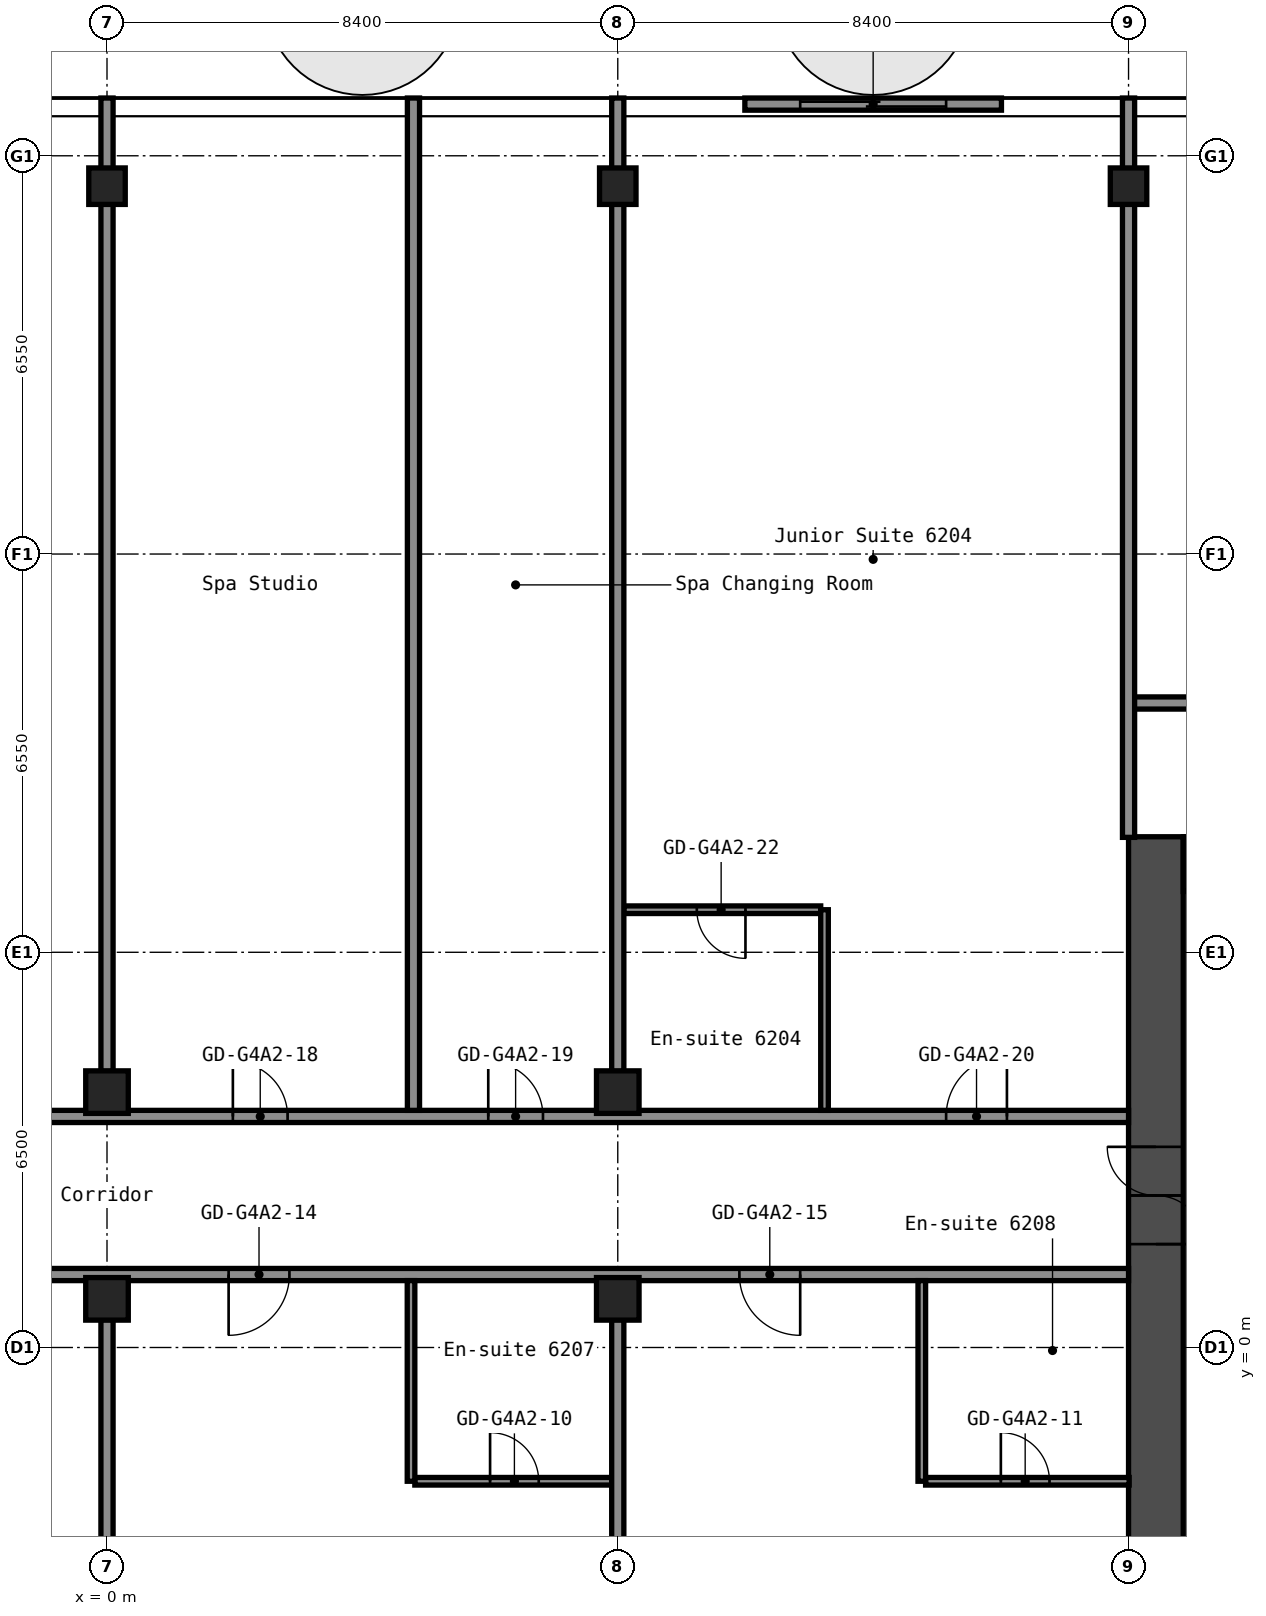
"""IFC4 building model, lengths in metres.
Left out: names, types, materials, properties, quantities, classifications, styles, units other than length and angle.
Written with IfcOpenShell. Run it as: python <this file> out.ifc"""

import sys

from ifc_helpers import new_model, si_unit, direction, frame, frame_2d, origin, origin_2d, place, context, subcontext, project, spatial, rectangle, hollow_rectangle, extrude, element, fill, save


model = new_model("IFC4")
c1 = context("Model", 3, precision=1e-05, world=origin(), true_north=direction((0.0, 1.0)))
c2 = subcontext(c1, "Body", "Model", "MODEL_VIEW")
j1 = project(units=[si_unit("LENGTHUNIT", "METRE"), si_unit("PLANEANGLEUNIT", "RADIAN")], contexts=[c1])
p1 = place(None, origin())
s1 = spatial("IfcSite", under=j1, at=p1, CompositionType="ELEMENT")
p2 = place(p1, origin())
s2 = spatial("IfcBuilding", under=s1, at=p2, CompositionType="ELEMENT")
p3 = place(p2, frame((0.0, 0.0, 218.6)))
s3 = spatial("IfcBuildingStorey", under=s2, at=p3, CompositionType="ELEMENT", Elevation=218.6)
for number, where, z_axis, x_axis in (
    (1, (0.0, 0.8, 0.0), (0.0, 0.0, 1.0), (1.0, 0.0, 0.0)),
    (2, (0.0, 4.2, 0.0), (0.0, 0.0, 1.0), (1.0, 0.0, 0.0)),
):
    element("IfcColumn", number, at=place(p3, frame(where, z_axis=z_axis, x_axis=x_axis)), inside=s3, PredefinedType="COLUMN", context=c2, shape_type="SweptSolid", body=[
        extrude(hollow_rectangle(XDim=0.7, YDim=0.7, WallThickness=0.028, at=origin_2d()), origin(), (0.0, 0.0, 1.0), 2.75),
    ])
p4 = place(p3, frame((0.0, 19.1, 0.0), z_axis=(0.0, 0.0, 1.0), x_axis=(1.0, 0.0, 0.0)))
e3 = element("IfcColumn", 3, at=p4, inside=s3, PredefinedType="COLUMN", context=c2, shape_type="SweptSolid", body=[
    extrude(hollow_rectangle(XDim=0.6, YDim=0.6, WallThickness=0.025, InnerFilletRadius=0.038, OuterFilletRadius=0.062, at=origin_2d()), origin(), (0.0, 0.0, 1.0), 2.75),
])
for number, where, z_axis, x_axis in (
    (4, (8.4, 0.8, 0.0), (0.0, 0.0, 1.0), (1.0, 0.0, 0.0)),
    (5, (8.4, 4.2, 0.0), (0.0, 0.0, 1.0), (1.0, 0.0, 0.0)),
):
    element("IfcColumn", number, at=place(p3, frame(where, z_axis=z_axis, x_axis=x_axis)), inside=s3, PredefinedType="COLUMN", context=c2, shape_type="SweptSolid", body=[
        extrude(hollow_rectangle(XDim=0.7, YDim=0.7, WallThickness=0.028, at=origin_2d()), origin(), (0.0, 0.0, 1.0), 2.75),
    ])
for number, where, z_axis, x_axis in (
    (6, (8.4, 19.1, 0.0), (0.0, 0.0, 1.0), (1.0, 0.0, 0.0)),
    (7, (16.8, 19.1, 0.0), (0.0, 0.0, 1.0), (1.0, 0.0, 0.0)),
):
    element("IfcColumn", number, at=place(p3, frame(where, z_axis=z_axis, x_axis=x_axis)), inside=s3, PredefinedType="COLUMN", context=c2, shape_type="SweptSolid", body=[
        extrude(hollow_rectangle(XDim=0.6, YDim=0.6, WallThickness=0.025, InnerFilletRadius=0.038, OuterFilletRadius=0.062, at=origin_2d()), origin(), (0.0, 0.0, 1.0), 2.75),
    ])
p5 = place(p3, frame((17.25, -8.4, 0.0), z_axis=(0.0, 0.0, 1.0), x_axis=(0.0, 1.0, 0.0)))
e8 = element("IfcWall", 8, at=p5, inside=s3, PredefinedType="SHEAR", context=c2, shape_type="SweptSolid", body=[
    extrude(rectangle(XDim=16.8, YDim=0.9, at=frame_2d((8.4, 0.0))), origin(), (0.0, 0.0, 1.0), 2.75),
])
p6 = place(p5, frame((10.1, 0.0, 0.0)))
e9 = element("IfcOpeningElement", 9, at=p6, cuts=e8, PredefinedType="OPENING", context=c2, shape_type="SweptSolid", body=[
    extrude(rectangle(XDim=1.6, YDim=2.1, at=frame_2d((0.8, 1.05))), frame((0.0, 0.46, 0.0), z_axis=(0.0, -1.0, 0.0), x_axis=(1.0, 0.0, 0.0)), (0.0, 0.0, 1.0), 0.92),
])
p7 = place(p3, frame((17.7, 7.95, 0.0), z_axis=(0.0, 0.0, 1.0), x_axis=(1.0, 0.0, 0.0)))
e10 = element("IfcWall", 10, at=p7, inside=s3, PredefinedType="SHEAR", context=c2, shape_type="SweptSolid", body=[
    extrude(rectangle(XDim=15.0, YDim=0.9, at=frame_2d((7.5, 0.0))), origin(), (0.0, 0.0, 1.0), 2.75),
])
p8 = place(p7, frame((10.4, 0.0, 0.0)))
e11 = element("IfcOpeningElement", 11, at=p8, cuts=e10, PredefinedType="OPENING", context=c2, shape_type="SweptSolid", body=[
    extrude(rectangle(XDim=1.2, YDim=2.1, at=frame_2d((0.6, 1.05))), frame((0.0, 0.46, 0.0), z_axis=(0.0, -1.0, 0.0), x_axis=(1.0, 0.0, 0.0)), (0.0, 0.0, 1.0), 0.92),
])
p9 = place(p7, frame((13.35, 0.0, 0.0)))
e12 = element("IfcOpeningElement", 12, at=p9, cuts=e10, PredefinedType="OPENING", context=c2, shape_type="SweptSolid", body=[
    extrude(rectangle(XDim=0.9, YDim=2.1, at=frame_2d((0.45, 1.05))), frame((0.0, 0.46, 0.0), z_axis=(0.0, -1.0, 0.0), x_axis=(1.0, 0.0, 0.0)), (0.0, 0.0, 1.0), 0.92),
])
p10 = place(p3, frame((5.062, -2.2, 0.0), z_axis=(0.0, 0.0, 1.0), x_axis=(1.0, 0.0, 0.0)))
e13 = element("IfcWall", 13, at=p10, inside=s3, PredefinedType="PARTITIONING", context=c2, shape_type="SweptSolid", body=[
    extrude(rectangle(XDim=3.238, YDim=0.125, at=frame_2d((1.619, 0.0))), origin(), (0.0, 0.0, 1.0), 2.75),
])
p11 = place(p10, frame((1.238, 0.0, 0.0)))
e14 = element("IfcOpeningElement", 14, at=p11, cuts=e13, PredefinedType="OPENING", context=c2, shape_type="SweptSolid", body=[
    extrude(rectangle(XDim=0.8, YDim=2.1, at=frame_2d((0.4, 1.05))), frame((0.0, 0.073, 0.0), z_axis=(0.0, -1.0, 0.0), x_axis=(1.0, 0.0, 0.0)), (0.0, 0.0, 1.0), 0.145),
])
p12 = place(p3, frame((13.462, -2.2, 0.0), z_axis=(0.0, 0.0, 1.0), x_axis=(1.0, 0.0, 0.0)))
e15 = element("IfcWall", 15, at=p12, inside=s3, PredefinedType="PARTITIONING", context=c2, shape_type="SweptSolid", body=[
    extrude(rectangle(XDim=3.348, YDim=0.125, at=frame_2d((1.674, 0.0))), origin(), (0.0, 0.0, 1.0), 2.75),
])
p13 = place(p12, frame((1.238, 0.0, 0.0)))
e16 = element("IfcOpeningElement", 16, at=p13, cuts=e15, PredefinedType="OPENING", context=c2, shape_type="SweptSolid", body=[
    extrude(rectangle(XDim=0.8, YDim=2.1, at=frame_2d((0.4, 1.05))), frame((0.0, 0.073, 0.0), z_axis=(0.0, -1.0, 0.0), x_axis=(1.0, 0.0, 0.0)), (0.0, 0.0, 1.0), 0.145),
])
p14 = place(p3, frame((-16.8, 1.2, 0.0), z_axis=(0.0, 0.0, 1.0), x_axis=(1.0, 0.0, 0.0)))
e17 = element("IfcWall", 17, at=p14, inside=s3, PredefinedType="PARTITIONING", context=c2, shape_type="SweptSolid", body=[
    extrude(rectangle(XDim=33.6, YDim=0.2, at=frame_2d((16.8, 0.0))), origin(), (0.0, 0.0, 1.0), 2.75),
])
p15 = place(p14, frame((2.0, 0.0, 0.0)))
e18 = element("IfcOpeningElement", 18, at=p15, cuts=e17, PredefinedType="OPENING", context=c2, shape_type="SweptSolid", body=[
    extrude(rectangle(XDim=1.0, YDim=2.1, at=frame_2d((0.5, 1.05))), frame((0.0, 0.11, 0.0), z_axis=(0.0, -1.0, 0.0), x_axis=(1.0, 0.0, 0.0)), (0.0, 0.0, 1.0), 0.22),
])
p16 = place(p14, frame((12.1, 0.0, 0.0)))
e19 = element("IfcOpeningElement", 19, at=p16, cuts=e17, PredefinedType="OPENING", context=c2, shape_type="SweptSolid", body=[
    extrude(rectangle(XDim=1.0, YDim=2.1, at=frame_2d((0.5, 1.05))), frame((0.0, 0.11, 0.0), z_axis=(0.0, -1.0, 0.0), x_axis=(1.0, 0.0, 0.0)), (0.0, 0.0, 1.0), 0.22),
])
p17 = place(p14, frame((18.8, 0.0, 0.0)))
e20 = element("IfcOpeningElement", 20, at=p17, cuts=e17, PredefinedType="OPENING", context=c2, shape_type="SweptSolid", body=[
    extrude(rectangle(XDim=1.0, YDim=2.1, at=frame_2d((0.5, 1.05))), frame((0.0, 0.11, 0.0), z_axis=(0.0, -1.0, 0.0), x_axis=(1.0, 0.0, 0.0)), (0.0, 0.0, 1.0), 0.22),
])
p18 = place(p14, frame((27.2, 0.0, 0.0)))
e21 = element("IfcOpeningElement", 21, at=p18, cuts=e17, PredefinedType="OPENING", context=c2, shape_type="SweptSolid", body=[
    extrude(rectangle(XDim=1.0, YDim=2.1, at=frame_2d((0.5, 1.05))), frame((0.0, 0.11, 0.0), z_axis=(0.0, -1.0, 0.0), x_axis=(1.0, 0.0, 0.0)), (0.0, 0.0, 1.0), 0.22),
])
p19 = place(p3, frame((-16.8, 3.8, 0.0), z_axis=(0.0, 0.0, 1.0), x_axis=(1.0, 0.0, 0.0)))
e22 = element("IfcWall", 22, at=p19, inside=s3, PredefinedType="PARTITIONING", context=c2, shape_type="SweptSolid", body=[
    extrude(rectangle(XDim=33.6, YDim=0.2, at=frame_2d((16.8, 0.0))), origin(), (0.0, 0.0, 1.0), 2.75),
])
p20 = place(p19, frame((5.4, 0.0, 0.0)))
e23 = element("IfcOpeningElement", 23, at=p20, cuts=e22, PredefinedType="OPENING", context=c2, shape_type="SweptSolid", body=[
    extrude(rectangle(XDim=1.0, YDim=2.1, at=frame_2d((0.5, 1.05))), frame((0.0, 0.11, 0.0), z_axis=(0.0, -1.0, 0.0), x_axis=(1.0, 0.0, 0.0)), (0.0, 0.0, 1.0), 0.22),
])
p21 = place(p19, frame((12.1, 0.0, 0.0)))
e24 = element("IfcOpeningElement", 24, at=p21, cuts=e22, PredefinedType="OPENING", context=c2, shape_type="SweptSolid", body=[
    extrude(rectangle(XDim=1.0, YDim=2.1, at=frame_2d((0.5, 1.05))), frame((0.0, 0.11, 0.0), z_axis=(0.0, -1.0, 0.0), x_axis=(1.0, 0.0, 0.0)), (0.0, 0.0, 1.0), 0.22),
])
p22 = place(p19, frame((18.87, 0.0, 0.0)))
e25 = element("IfcOpeningElement", 25, at=p22, cuts=e22, PredefinedType="OPENING", context=c2, shape_type="SweptSolid", body=[
    extrude(rectangle(XDim=0.9, YDim=2.1, at=frame_2d((0.45, 1.05))), frame((0.0, 0.11, 0.0), z_axis=(0.0, -1.0, 0.0), x_axis=(1.0, 0.0, 0.0)), (0.0, 0.0, 1.0), 0.22),
])
p23 = place(p19, frame((23.07, 0.0, 0.0)))
e26 = element("IfcOpeningElement", 26, at=p23, cuts=e22, PredefinedType="OPENING", context=c2, shape_type="SweptSolid", body=[
    extrude(rectangle(XDim=0.9, YDim=2.1, at=frame_2d((0.45, 1.05))), frame((0.0, 0.11, 0.0), z_axis=(0.0, -1.0, 0.0), x_axis=(1.0, 0.0, 0.0)), (0.0, 0.0, 1.0), 0.22),
])
p24 = place(p19, frame((30.6, 0.0, 0.0)))
e27 = element("IfcOpeningElement", 27, at=p24, cuts=e22, PredefinedType="OPENING", context=c2, shape_type="SweptSolid", body=[
    extrude(rectangle(XDim=1.0, YDim=2.1, at=frame_2d((0.5, 1.05))), frame((0.0, 0.11, 0.0), z_axis=(0.0, -1.0, 0.0), x_axis=(1.0, 0.0, 0.0)), (0.0, 0.0, 1.0), 0.22),
])
p25 = place(p3, frame((8.5, 7.2, 0.0), z_axis=(0.0, 0.0, 1.0), x_axis=(1.0, 0.0, 0.0)))
e28 = element("IfcWall", 28, at=p25, inside=s3, PredefinedType="PARTITIONING", context=c2, shape_type="SweptSolid", body=[
    extrude(rectangle(XDim=3.238, YDim=0.125, at=frame_2d((1.619, 0.0))), origin(), (0.0, 0.0, 1.0), 2.75),
])
p26 = place(p25, frame((1.2, 0.0, 0.0)))
e29 = element("IfcOpeningElement", 29, at=p26, cuts=e28, PredefinedType="OPENING", context=c2, shape_type="SweptSolid", body=[
    extrude(rectangle(XDim=0.8, YDim=2.1, at=frame_2d((0.4, 1.05))), frame((0.0, 0.073, 0.0), z_axis=(0.0, -1.0, 0.0), x_axis=(1.0, 0.0, 0.0)), (0.0, 0.0, 1.0), 0.145),
])
p27 = place(p3, frame((16.8, 10.6, 0.0), z_axis=(0.0, 0.0, 1.0), x_axis=(1.0, 0.0, 0.0)))
e30 = element("IfcWall", 30, at=p27, inside=s3, PredefinedType="PARTITIONING", context=c2, shape_type="SweptSolid", body=[
    extrude(rectangle(XDim=21.3, YDim=0.2, at=frame_2d((10.65, 0.0))), origin(), (0.0, 0.0, 1.0), 2.75),
])
p28 = place(p27, frame((2.0, 0.0, 0.0)))
e31 = element("IfcOpeningElement", 31, at=p28, cuts=e30, PredefinedType="OPENING", context=c2, shape_type="SweptSolid", body=[
    extrude(rectangle(XDim=1.0, YDim=2.1, at=frame_2d((0.5, 1.05))), frame((0.0, 0.11, 0.0), z_axis=(0.0, -1.0, 0.0), x_axis=(1.0, 0.0, 0.0)), (0.0, 0.0, 1.0), 0.22),
])
p29 = place(p27, frame((13.8, 0.0, 0.0)))
e32 = element("IfcOpeningElement", 32, at=p29, cuts=e30, PredefinedType="OPENING", context=c2, shape_type="SweptSolid", body=[
    extrude(rectangle(XDim=1.0, YDim=2.1, at=frame_2d((0.5, 1.05))), frame((0.0, 0.11, 0.0), z_axis=(0.0, -1.0, 0.0), x_axis=(1.0, 0.0, 0.0)), (0.0, 0.0, 1.0), 0.22),
])
p30 = place(p27, frame((19.65, 0.0, 0.0)))
e33 = element("IfcOpeningElement", 33, at=p30, cuts=e30, PredefinedType="OPENING", context=c2, shape_type="SweptSolid", body=[
    extrude(rectangle(XDim=1.0, YDim=2.1, at=frame_2d((0.5, 1.05))), frame((0.0, 0.11, 0.0), z_axis=(0.0, -1.0, 0.0), x_axis=(1.0, 0.0, 0.0)), (0.0, 0.0, 1.0), 0.22),
])
for number, where, z_axis, x_axis in (
    (34, (0.0, -15.55, 0.0), (0.0, 0.0, 1.0), (0.0, 1.0, 0.0)),
    (35, (0.0, 4.54, 0.0), (0.0, 0.0, 1.0), (0.0, 1.0, 0.0)),
):
    element("IfcWall", number, at=place(p3, frame(where, z_axis=z_axis, x_axis=x_axis)), inside=s3, PredefinedType="PARTITIONING", context=c2, shape_type="SweptSolid", body=[
        extrude(rectangle(XDim=16.01, YDim=0.2, at=frame_2d((8.005, 0.0))), origin(), (0.0, 0.0, 1.0), 2.75),
    ])
p31 = place(p3, frame((5.0, -2.2, 0.0), z_axis=(0.0, 0.0, 1.0), x_axis=(0.0, 1.0, 0.0)))
e36 = element("IfcWall", 36, at=p31, inside=s3, PredefinedType="PARTITIONING", context=c2, shape_type="SweptSolid", body=[
    extrude(rectangle(XDim=3.3, YDim=0.125, at=frame_2d((1.65, 0.0))), origin(), (0.0, 0.0, 1.0), 2.75),
])
p32 = place(p3, frame((5.04, 3.9, 0.0), z_axis=(0.0, 0.0, 1.0), x_axis=(0.0, 1.0, 0.0)))
e37 = element("IfcWall", 37, at=p32, inside=s3, PredefinedType="PARTITIONING", context=c2, shape_type="SweptSolid", body=[
    extrude(rectangle(XDim=16.65, YDim=0.2, at=frame_2d((8.325, 0.0))), origin(), (0.0, 0.0, 1.0), 2.75),
])
for number, where, z_axis, x_axis in (
    (38, (8.4, -15.55, 0.0), (0.0, 0.0, 1.0), (0.0, 1.0, 0.0)),
    (39, (8.4, 4.54, 0.0), (0.0, 0.0, 1.0), (0.0, 1.0, 0.0)),
):
    element("IfcWall", number, at=place(p3, frame(where, z_axis=z_axis, x_axis=x_axis)), inside=s3, PredefinedType="PARTITIONING", context=c2, shape_type="SweptSolid", body=[
        extrude(rectangle(XDim=16.01, YDim=0.2, at=frame_2d((8.005, 0.0))), origin(), (0.0, 0.0, 1.0), 2.75),
    ])
for number, where, z_axis, x_axis in (
    (40, (11.8, 3.9, 0.0), (0.0, 0.0, 1.0), (0.0, 1.0, 0.0)),
    (41, (13.4, -2.2, 0.0), (0.0, 0.0, 1.0), (0.0, 1.0, 0.0)),
):
    element("IfcWall", number, at=place(p3, frame(where, z_axis=z_axis, x_axis=x_axis)), inside=s3, PredefinedType="PARTITIONING", context=c2, shape_type="SweptSolid", body=[
        extrude(rectangle(XDim=3.3, YDim=0.125, at=frame_2d((1.65, 0.0))), origin(), (0.0, 0.0, 1.0), 2.75),
    ])
p33 = place(p3, frame((16.8, 8.39, 0.0), z_axis=(0.0, 0.0, 1.0), x_axis=(0.0, 1.0, 0.0)))
e42 = element("IfcWall", 42, at=p33, inside=s3, PredefinedType="PARTITIONING", context=c2, shape_type="SweptSolid", body=[
    extrude(rectangle(XDim=12.16, YDim=0.2, at=frame_2d((6.08, 0.0))), origin(), (0.0, 0.0, 1.0), 2.75),
])
p34 = place(p3, frame((14.71, 20.45, 0.0), z_axis=(0.0, 0.0, 1.0), x_axis=(-1.0, 0.0, 0.0)))
p35 = place(p34, frame((0.91, 0.0, 0.0)))
p36 = place(p35, frame((2.4, 0.0, 0.0), z_axis=(0.0, 0.0, 1.0), x_axis=(-1.0, 0.0, 0.0)))
e43 = element("IfcDoor", 43, at=p36, inside=s3, OperationType="SLIDING_TO_LEFT", PredefinedType="DOOR", context=c2, shape_type="SweptSolid", body=[
    extrude(rectangle(XDim=2.4, YDim=2.2, at=frame_2d((1.2, 1.1))), frame((0.0, 0.025, 0.0), z_axis=(0.0, -1.0, 0.0), x_axis=(1.0, 0.0, 0.0)), (0.0, 0.0, 1.0), 0.05),
])
p37 = place(p6, origin())
e44 = element("IfcDoor", 44, at=p37, inside=s3, OperationType="DOUBLE_DOOR_SINGLE_SWING", PredefinedType="DOOR", context=c2, shape_type="SweptSolid", body=[
    extrude(rectangle(XDim=1.6, YDim=2.1, at=frame_2d((0.8, 1.05))), frame((0.0, 0.025, 0.0), z_axis=(0.0, -1.0, 0.0), x_axis=(1.0, 0.0, 0.0)), (0.0, 0.0, 1.0), 0.05),
])
fill(e9, e44)
p38 = place(p11, origin())
e45 = element("IfcDoor", 45, at=p38, inside=s3, OperationType="SINGLE_SWING_RIGHT", PredefinedType="DOOR", context=c2, shape_type="SweptSolid", body=[
    extrude(rectangle(XDim=0.8, YDim=2.1, at=frame_2d((0.4, 1.05))), frame((0.0, 0.025, 0.0), z_axis=(0.0, -1.0, 0.0), x_axis=(1.0, 0.0, 0.0)), (0.0, 0.0, 1.0), 0.05),
])
fill(e14, e45)
p39 = place(p13, origin())
e46 = element("IfcDoor", 46, at=p39, inside=s3, OperationType="SINGLE_SWING_RIGHT", PredefinedType="DOOR", context=c2, shape_type="SweptSolid", body=[
    extrude(rectangle(XDim=0.8, YDim=2.1, at=frame_2d((0.4, 1.05))), frame((0.0, 0.025, 0.0), z_axis=(0.0, -1.0, 0.0), x_axis=(1.0, 0.0, 0.0)), (0.0, 0.0, 1.0), 0.05),
])
fill(e16, e46)
p40 = place(p17, origin())
e47 = element("IfcDoor", 47, at=p40, inside=s3, OperationType="SINGLE_SWING_LEFT", PredefinedType="DOOR", context=c2, shape_type="SweptSolid", body=[
    extrude(rectangle(XDim=1.0, YDim=2.1, at=frame_2d((0.5, 1.05))), frame((0.0, 0.025, 0.0), z_axis=(0.0, -1.0, 0.0), x_axis=(1.0, 0.0, 0.0)), (0.0, 0.0, 1.0), 0.05),
])
fill(e20, e47)
p41 = place(p18, origin())
e48 = element("IfcDoor", 48, at=p41, inside=s3, OperationType="SINGLE_SWING_RIGHT", PredefinedType="DOOR", context=c2, shape_type="SweptSolid", body=[
    extrude(rectangle(XDim=1.0, YDim=2.1, at=frame_2d((0.5, 1.05))), frame((0.0, 0.025, 0.0), z_axis=(0.0, -1.0, 0.0), x_axis=(1.0, 0.0, 0.0)), (0.0, 0.0, 1.0), 0.05),
])
fill(e21, e48)
p42 = place(p22, origin())
e49 = element("IfcDoor", 49, at=p42, inside=s3, OperationType="SINGLE_SWING_RIGHT", PredefinedType="DOOR", context=c2, shape_type="SweptSolid", body=[
    extrude(rectangle(XDim=0.9, YDim=2.1, at=frame_2d((0.45, 1.05))), frame((0.0, 0.025, 0.0), z_axis=(0.0, -1.0, 0.0), x_axis=(1.0, 0.0, 0.0)), (0.0, 0.0, 1.0), 0.05),
])
fill(e25, e49)
p43 = place(p23, origin())
e50 = element("IfcDoor", 50, at=p43, inside=s3, OperationType="SINGLE_SWING_RIGHT", PredefinedType="DOOR", context=c2, shape_type="SweptSolid", body=[
    extrude(rectangle(XDim=0.9, YDim=2.1, at=frame_2d((0.45, 1.05))), frame((0.0, 0.025, 0.0), z_axis=(0.0, -1.0, 0.0), x_axis=(1.0, 0.0, 0.0)), (0.0, 0.0, 1.0), 0.05),
])
fill(e26, e50)
p44 = place(p24, origin())
e51 = element("IfcDoor", 51, at=p44, inside=s3, OperationType="SINGLE_SWING_LEFT", PredefinedType="DOOR", context=c2, shape_type="SweptSolid", body=[
    extrude(rectangle(XDim=1.0, YDim=2.1, at=frame_2d((0.5, 1.05))), frame((0.0, 0.025, 0.0), z_axis=(0.0, -1.0, 0.0), x_axis=(1.0, 0.0, 0.0)), (0.0, 0.0, 1.0), 0.05),
])
fill(e27, e51)
p45 = place(p26, origin())
e52 = element("IfcDoor", 52, at=p45, inside=s3, OperationType="SINGLE_SWING_RIGHT", PredefinedType="DOOR", context=c2, shape_type="SweptSolid", body=[
    extrude(rectangle(XDim=0.8, YDim=2.1, at=frame_2d((0.4, 1.05))), frame((0.0, 0.025, 0.0), z_axis=(0.0, -1.0, 0.0), x_axis=(1.0, 0.0, 0.0)), (0.0, 0.0, 1.0), 0.05),
])
fill(e29, e52)
save(model, sys.argv[1])
